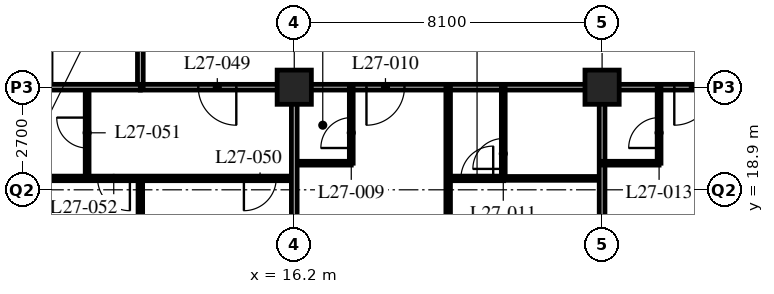
"""IFC4 building model, lengths in metres.
Left out: names, types, materials, properties, quantities, classifications, styles, units other than length and angle.
Written with IfcOpenShell. Run it as: python <this file> out.ifc"""

import sys

from ifc_helpers import new_model, si_unit, direction, frame, frame_2d, origin, origin_2d, place, context, subcontext, project, spatial, rectangle, hollow_rectangle, extrude, element, fill, save


model = new_model("IFC4")
c1 = context("Model", 3, precision=1e-05, world=origin(), true_north=direction((0.0, 1.0)))
c2 = subcontext(c1, "Body", "Model", "MODEL_VIEW")
j1 = project(units=[si_unit("LENGTHUNIT", "METRE"), si_unit("PLANEANGLEUNIT", "RADIAN")], contexts=[c1])
p1 = place(None, origin())
s1 = spatial("IfcSite", under=j1, at=p1, CompositionType="ELEMENT")
p2 = place(p1, origin())
s2 = spatial("IfcBuilding", under=s1, at=p2, CompositionType="ELEMENT")
p3 = place(p2, frame((0.0, 0.0, 110.2)))
s3 = spatial("IfcBuildingStorey", under=s2, at=p3, CompositionType="ELEMENT", Elevation=110.2)
for number, where, z_axis, x_axis in (
    (1, (16.2, 21.6, 0.0), (0.0, 0.0, 1.0), (1.0, 0.0, 0.0)),
    (2, (24.3, 21.6, 0.0), (0.0, 0.0, 1.0), (1.0, 0.0, 0.0)),
):
    element("IfcColumn", number, at=place(p3, frame(where, z_axis=z_axis, x_axis=x_axis)), inside=s3, PredefinedType="COLUMN", context=c2, shape_type="SweptSolid", body=[
        extrude(hollow_rectangle(XDim=0.9, YDim=0.9, WallThickness=0.09, at=origin_2d()), origin(), (0.0, 0.0, 1.0), 3.4),
    ])
p4 = place(p3, frame((12.15, 21.6, 0.0), z_axis=(0.0, 0.0, 1.0), x_axis=(1.0, 0.0, 0.0)))
e3 = element("IfcWall", 3, at=p4, inside=s3, PredefinedType="PARTITIONING", context=c2, shape_type="SweptSolid", body=[
    extrude(rectangle(XDim=32.4, YDim=0.15, at=frame_2d((16.2, 0.0))), origin(), (0.0, 0.0, 1.0), 2.578),
])
p5 = place(p4, frame((5.95, 0.0, 0.0)))
e4 = element("IfcOpeningElement", 4, at=p5, cuts=e3, PredefinedType="OPENING", context=c2, shape_type="SweptSolid", body=[
    extrude(rectangle(XDim=1.0, YDim=2.1, at=frame_2d((0.5, 1.05))), frame((0.0, 0.085, 0.0), z_axis=(0.0, -1.0, 0.0), x_axis=(1.0, 0.0, 0.0)), (0.0, 0.0, 1.0), 0.17),
])
p6 = place(p4, frame((14.05, 0.0, 0.0)))
e5 = element("IfcOpeningElement", 5, at=p6, cuts=e3, PredefinedType="OPENING", context=c2, shape_type="SweptSolid", body=[
    extrude(rectangle(XDim=1.0, YDim=2.1, at=frame_2d((0.5, 1.05))), frame((0.0, 0.085, 0.0), z_axis=(0.0, -1.0, 0.0), x_axis=(1.0, 0.0, 0.0)), (0.0, 0.0, 1.0), 0.17),
])
p7 = place(p4, frame((22.15, 0.0, 0.0)))
e6 = element("IfcOpeningElement", 6, at=p7, cuts=e3, PredefinedType="OPENING", context=c2, shape_type="SweptSolid", body=[
    extrude(rectangle(XDim=1.0, YDim=2.1, at=frame_2d((0.5, 1.05))), frame((0.0, 0.085, 0.0), z_axis=(0.0, -1.0, 0.0), x_axis=(1.0, 0.0, 0.0)), (0.0, 0.0, 1.0), 0.17),
])
p8 = place(p4, frame((1.525, 0.0, 0.0)))
e7 = element("IfcOpeningElement", 7, at=p8, cuts=e3, PredefinedType="OPENING", context=c2, shape_type="SweptSolid", body=[
    extrude(rectangle(XDim=1.0, YDim=2.1, at=frame_2d((0.5, 1.05))), frame((0.0, 0.085, 0.0), z_axis=(0.0, -1.0, 0.0), x_axis=(1.0, 0.0, 0.0)), (0.0, 0.0, 1.0), 0.17),
])
p9 = place(p4, frame((29.875, 0.0, 0.0)))
e8 = element("IfcOpeningElement", 8, at=p9, cuts=e3, PredefinedType="OPENING", context=c2, shape_type="SweptSolid", body=[
    extrude(rectangle(XDim=1.0, YDim=2.1, at=frame_2d((0.5, 1.05))), frame((0.0, 0.085, 0.0), z_axis=(0.0, -1.0, 0.0), x_axis=(1.0, 0.0, 0.0)), (0.0, 0.0, 1.0), 0.17),
])
p10 = place(p3, frame((12.15, 21.6, 0.0), z_axis=(0.0, 0.0, 1.0), x_axis=(0.0, 1.0, 0.0)))
e9 = element("IfcWall", 9, at=p10, inside=s3, PredefinedType="PARTITIONING", context=c2, shape_type="SweptSolid", body=[
    extrude(rectangle(XDim=24.3, YDim=0.15, at=frame_2d((12.15, 0.0))), origin(), (0.0, 0.0, 1.0), 3.19),
])
p11 = place(p10, frame((5.45, 0.0, 0.0)))
e10 = element("IfcOpeningElement", 10, at=p11, cuts=e9, PredefinedType="OPENING", context=c2, shape_type="SweptSolid", body=[
    extrude(rectangle(XDim=1.0, YDim=2.1, at=frame_2d((0.5, 1.05))), frame((0.0, 0.085, 0.0), z_axis=(0.0, -1.0, 0.0), x_axis=(1.0, 0.0, 0.0)), (0.0, 0.0, 1.0), 0.17),
])
p12 = place(p10, frame((13.55, 0.0, 0.0)))
e11 = element("IfcOpeningElement", 11, at=p12, cuts=e9, PredefinedType="OPENING", context=c2, shape_type="SweptSolid", body=[
    extrude(rectangle(XDim=1.0, YDim=2.1, at=frame_2d((0.5, 1.05))), frame((0.0, 0.085, 0.0), z_axis=(0.0, -1.0, 0.0), x_axis=(1.0, 0.0, 0.0)), (0.0, 0.0, 1.0), 0.17),
])
p13 = place(p10, frame((21.65, 0.0, 0.0)))
e12 = element("IfcOpeningElement", 12, at=p13, cuts=e9, PredefinedType="OPENING", context=c2, shape_type="SweptSolid", body=[
    extrude(rectangle(XDim=1.0, YDim=2.1, at=frame_2d((0.5, 1.05))), frame((0.0, 0.085, 0.0), z_axis=(0.0, -1.0, 0.0), x_axis=(1.0, 0.0, 0.0)), (0.0, 0.0, 1.0), 0.17),
])
p14 = place(p3, frame((16.2, 19.6, 0.0), z_axis=(0.0, 0.0, 1.0), x_axis=(1.0, 0.0, 0.0)))
e13 = element("IfcWall", 13, at=p14, inside=s3, PredefinedType="PARTITIONING", context=c2, shape_type="SweptSolid", body=[
    extrude(rectangle(XDim=1.5, YDim=0.1, at=frame_2d((0.75, 0.0))), origin(), (0.0, 0.0, 1.0), 3.19),
])
p15 = place(p3, frame((17.7, 21.6, 0.0), z_axis=(0.0, 0.0, 1.0), x_axis=(0.0, -1.0, 0.0)))
e14 = element("IfcWall", 14, at=p15, inside=s3, PredefinedType="PARTITIONING", context=c2, shape_type="SweptSolid", body=[
    extrude(rectangle(XDim=2.0, YDim=0.1, at=frame_2d((1.0, 0.0))), origin(), (0.0, 0.0, 1.0), 3.19),
])
p16 = place(p15, frame((0.8, 0.0, 0.0)))
e15 = element("IfcOpeningElement", 15, at=p16, cuts=e14, PredefinedType="OPENING", context=c2, shape_type="SweptSolid", body=[
    extrude(rectangle(XDim=0.8, YDim=2.1, at=frame_2d((0.4, 1.05))), frame((0.0, 0.06, 0.0), z_axis=(0.0, -1.0, 0.0), x_axis=(1.0, 0.0, 0.0)), (0.0, 0.0, 1.0), 0.12),
])
p17 = place(p3, frame((21.7, 19.2, 0.0), z_axis=(0.0, 0.0, 1.0), x_axis=(1.0, 0.0, 0.0)))
e16 = element("IfcWall", 16, at=p17, inside=s3, PredefinedType="PARTITIONING", context=c2, shape_type="SweptSolid", body=[
    extrude(rectangle(XDim=2.6, YDim=0.1, at=frame_2d((1.3, 0.0))), origin(), (0.0, 0.0, 1.0), 3.19),
])
p18 = place(p3, frame((21.7, 21.6, 0.0), z_axis=(0.0, 0.0, 1.0), x_axis=(0.0, -1.0, 0.0)))
e17 = element("IfcWall", 17, at=p18, inside=s3, PredefinedType="PARTITIONING", context=c2, shape_type="SweptSolid", body=[
    extrude(rectangle(XDim=2.4, YDim=0.1, at=frame_2d((1.2, 0.0))), origin(), (0.0, 0.0, 1.0), 3.19),
])
p19 = place(p18, frame((1.35, 0.0, 0.0)))
e18 = element("IfcOpeningElement", 18, at=p19, cuts=e17, PredefinedType="OPENING", context=c2, shape_type="SweptSolid", body=[
    extrude(rectangle(XDim=0.8, YDim=2.1, at=frame_2d((0.4, 1.05))), frame((0.0, 0.06, 0.0), z_axis=(0.0, -1.0, 0.0), x_axis=(1.0, 0.0, 0.0)), (0.0, 0.0, 1.0), 0.12),
])
p20 = place(p3, frame((20.25, 21.6, 0.0), z_axis=(0.0, 0.0, 1.0), x_axis=(0.0, -1.0, 0.0)))
e19 = element("IfcWall", 19, at=p20, inside=s3, PredefinedType="PARTITIONING", context=c2, shape_type="SweptSolid", body=[
    extrude(rectangle(XDim=15.9, YDim=0.12, at=frame_2d((7.95, 0.0))), origin(), (0.0, 0.0, 1.0), 3.19),
])
p21 = place(p20, frame((8.875, 0.0, 0.0)))
e20 = element("IfcOpeningElement", 20, at=p21, cuts=e19, PredefinedType="OPENING", context=c2, shape_type="SweptSolid", body=[
    extrude(rectangle(XDim=0.85, YDim=2.1, at=frame_2d((0.425, 1.05))), frame((0.0, 0.07, 0.0), z_axis=(0.0, -1.0, 0.0), x_axis=(1.0, 0.0, 0.0)), (0.0, 0.0, 1.0), 0.14),
])
p22 = place(p3, frame((24.3, 21.6, 0.0), z_axis=(0.0, 0.0, 1.0), x_axis=(0.0, -1.0, 0.0)))
e21 = element("IfcWall", 21, at=p22, inside=s3, PredefinedType="PARTITIONING", context=c2, shape_type="SweptSolid", body=[
    extrude(rectangle(XDim=15.9, YDim=0.15, at=frame_2d((7.95, 0.0))), origin(), (0.0, 0.0, 1.0), 2.578),
])
p23 = place(p3, frame((24.3, 19.6, 0.0), z_axis=(0.0, 0.0, 1.0), x_axis=(1.0, 0.0, 0.0)))
e22 = element("IfcWall", 22, at=p23, inside=s3, PredefinedType="PARTITIONING", context=c2, shape_type="SweptSolid", body=[
    extrude(rectangle(XDim=1.5, YDim=0.1, at=frame_2d((0.75, 0.0))), origin(), (0.0, 0.0, 1.0), 3.19),
])
p24 = place(p3, frame((25.8, 21.6, 0.0), z_axis=(0.0, 0.0, 1.0), x_axis=(0.0, -1.0, 0.0)))
e23 = element("IfcWall", 23, at=p24, inside=s3, PredefinedType="PARTITIONING", context=c2, shape_type="SweptSolid", body=[
    extrude(rectangle(XDim=2.0, YDim=0.1, at=frame_2d((1.0, 0.0))), origin(), (0.0, 0.0, 1.0), 3.19),
])
p25 = place(p24, frame((0.8, 0.0, 0.0)))
e24 = element("IfcOpeningElement", 24, at=p25, cuts=e23, PredefinedType="OPENING", context=c2, shape_type="SweptSolid", body=[
    extrude(rectangle(XDim=0.8, YDim=2.1, at=frame_2d((0.4, 1.05))), frame((0.0, 0.06, 0.0), z_axis=(0.0, -1.0, 0.0), x_axis=(1.0, 0.0, 0.0)), (0.0, 0.0, 1.0), 0.12),
])
p26 = place(p3, frame((10.75, 21.6, 0.0), z_axis=(0.0, 0.0, 1.0), x_axis=(0.0, -1.0, 0.0)))
e25 = element("IfcWall", 25, at=p26, inside=s3, PredefinedType="PARTITIONING", context=c2, shape_type="SweptSolid", body=[
    extrude(rectangle(XDim=2.4, YDim=0.1, at=frame_2d((1.2, 0.0))), origin(), (0.0, 0.0, 1.0), 3.19),
])
p27 = place(p26, frame((0.8, 0.0, 0.0)))
e26 = element("IfcOpeningElement", 26, at=p27, cuts=e25, PredefinedType="OPENING", context=c2, shape_type="SweptSolid", body=[
    extrude(rectangle(XDim=0.8, YDim=2.1, at=frame_2d((0.4, 1.05))), frame((0.0, 0.06, 0.0), z_axis=(0.0, -1.0, 0.0), x_axis=(1.0, 0.0, 0.0)), (0.0, 0.0, 1.0), 0.12),
])
p28 = place(p3, frame((8.15, 19.2, 0.0), z_axis=(0.0, 0.0, 1.0), x_axis=(1.0, 0.0, 0.0)))
e27 = element("IfcWall", 27, at=p28, inside=s3, PredefinedType="PARTITIONING", context=c2, shape_type="SweptSolid", body=[
    extrude(rectangle(XDim=8.05, YDim=0.12, at=frame_2d((4.025, 0.0))), origin(), (0.0, 0.0, 1.0), 3.19),
])
p29 = place(p28, frame((6.725, 0.0, 0.0)))
e28 = element("IfcOpeningElement", 28, at=p29, cuts=e27, PredefinedType="OPENING", context=c2, shape_type="SweptSolid", body=[
    extrude(rectangle(XDim=0.85, YDim=2.1, at=frame_2d((0.425, 1.05))), frame((0.0, 0.07, 0.0), z_axis=(0.0, -1.0, 0.0), x_axis=(1.0, 0.0, 0.0)), (0.0, 0.0, 1.0), 0.14),
])
p30 = place(p28, frame((2.875, 0.0, 0.0)))
e29 = element("IfcOpeningElement", 29, at=p30, cuts=e27, PredefinedType="OPENING", context=c2, shape_type="SweptSolid", body=[
    extrude(rectangle(XDim=0.85, YDim=2.1, at=frame_2d((0.425, 1.05))), frame((0.0, 0.07, 0.0), z_axis=(0.0, -1.0, 0.0), x_axis=(1.0, 0.0, 0.0)), (0.0, 0.0, 1.0), 0.14),
])
p31 = place(p3, frame((12.15, 19.2, 0.0), z_axis=(0.0, 0.0, 1.0), x_axis=(0.0, -1.0, 0.0)))
e30 = element("IfcWall", 30, at=p31, inside=s3, PredefinedType="PARTITIONING", context=c2, shape_type="SweptSolid", body=[
    extrude(rectangle(XDim=13.5, YDim=0.12, at=frame_2d((6.75, 0.0))), origin(), (0.0, 0.0, 1.0), 3.19),
])
p32 = place(p3, frame((0.3, 21.6, 0.0), z_axis=(0.0, 0.0, 1.0), x_axis=(1.0, 0.0, 0.0)))
e31 = element("IfcWall", 31, at=p32, inside=s3, PredefinedType="PARTITIONING", context=c2, shape_type="SweptSolid", body=[
    extrude(rectangle(XDim=11.85, YDim=0.15, at=frame_2d((5.925, 0.0))), origin(), (0.0, 0.0, 1.0), 2.578),
])
p33 = place(p3, frame((16.2, 21.6, 0.0), z_axis=(0.0, 0.0, 1.0), x_axis=(0.0, -1.0, 0.0)))
e32 = element("IfcWall", 32, at=p33, inside=s3, PredefinedType="PARTITIONING", context=c2, shape_type="SweptSolid", body=[
    extrude(rectangle(XDim=15.9, YDim=0.15, at=frame_2d((7.95, 0.0))), origin(), (0.0, 0.0, 1.0), 2.578),
])
p34 = place(p3, frame((21.71, 19.2, 0.0), z_axis=(0.0, 0.0, 1.0), x_axis=(-1.0, 0.0, 0.0)))
e33 = element("IfcWall", 33, at=p34, inside=s3, PredefinedType="PARTITIONING", context=c2, shape_type="SweptSolid", body=[
    extrude(rectangle(XDim=1.46, YDim=0.12, at=frame_2d((0.73, 0.0))), origin(), (0.0, 0.0, 1.0), 3.19),
])
p35 = place(p34, frame((0.275, 0.0, 0.0)))
e34 = element("IfcOpeningElement", 34, at=p35, cuts=e33, PredefinedType="OPENING", context=c2, shape_type="SweptSolid", body=[
    extrude(rectangle(XDim=0.85, YDim=2.1, at=frame_2d((0.425, 1.05))), frame((0.0, 0.07, 0.0), z_axis=(0.0, -1.0, 0.0), x_axis=(1.0, 0.0, 0.0)), (0.0, 0.0, 1.0), 0.14),
])
p36 = place(p16, origin())
e35 = element("IfcDoor", 35, at=p36, inside=s3, OperationType="SINGLE_SWING_LEFT", PredefinedType="DOOR", context=c2, shape_type="SweptSolid", body=[
    extrude(rectangle(XDim=0.8, YDim=2.1, at=frame_2d((0.4, 1.05))), frame((0.0, 0.025, 0.0), z_axis=(0.0, -1.0, 0.0), x_axis=(1.0, 0.0, 0.0)), (0.0, 0.0, 1.0), 0.05),
])
fill(e15, e35)
p37 = place(p5, origin())
e36 = element("IfcDoor", 36, at=p37, inside=s3, OperationType="SINGLE_SWING_RIGHT", PredefinedType="DOOR", context=c2, shape_type="SweptSolid", body=[
    extrude(rectangle(XDim=1.0, YDim=2.1, at=frame_2d((0.5, 1.05))), frame((0.0, 0.025, 0.0), z_axis=(0.0, -1.0, 0.0), x_axis=(1.0, 0.0, 0.0)), (0.0, 0.0, 1.0), 0.05),
])
fill(e4, e36)
p38 = place(p19, origin())
e37 = element("IfcDoor", 37, at=p38, inside=s3, OperationType="SINGLE_SWING_LEFT", PredefinedType="DOOR", context=c2, shape_type="SweptSolid", body=[
    extrude(rectangle(XDim=0.8, YDim=2.1, at=frame_2d((0.4, 1.05))), frame((0.0, 0.025, 0.0), z_axis=(0.0, -1.0, 0.0), x_axis=(1.0, 0.0, 0.0)), (0.0, 0.0, 1.0), 0.05),
])
fill(e18, e37)
p39 = place(p25, origin())
e38 = element("IfcDoor", 38, at=p39, inside=s3, OperationType="SINGLE_SWING_LEFT", PredefinedType="DOOR", context=c2, shape_type="SweptSolid", body=[
    extrude(rectangle(XDim=0.8, YDim=2.1, at=frame_2d((0.4, 1.05))), frame((0.0, 0.025, 0.0), z_axis=(0.0, -1.0, 0.0), x_axis=(1.0, 0.0, 0.0)), (0.0, 0.0, 1.0), 0.05),
])
fill(e24, e38)
p40 = place(p6, origin())
e39 = element("IfcDoor", 39, at=p40, inside=s3, OperationType="SINGLE_SWING_RIGHT", PredefinedType="DOOR", context=c2, shape_type="SweptSolid", body=[
    extrude(rectangle(XDim=1.0, YDim=2.1, at=frame_2d((0.5, 1.05))), frame((0.0, 0.025, 0.0), z_axis=(0.0, -1.0, 0.0), x_axis=(1.0, 0.0, 0.0)), (0.0, 0.0, 1.0), 0.05),
])
fill(e5, e39)
p41 = place(p8, origin())
e40 = element("IfcDoor", 40, at=p41, inside=s3, OperationType="SINGLE_SWING_LEFT", PredefinedType="DOOR", context=c2, shape_type="SweptSolid", body=[
    extrude(rectangle(XDim=1.0, YDim=2.1, at=frame_2d((0.5, 1.05))), frame((0.0, 0.025, 0.0), z_axis=(0.0, -1.0, 0.0), x_axis=(1.0, 0.0, 0.0)), (0.0, 0.0, 1.0), 0.05),
])
fill(e7, e40)
p42 = place(p29, origin())
e41 = element("IfcDoor", 41, at=p42, inside=s3, OperationType="SINGLE_SWING_RIGHT", PredefinedType="DOOR", context=c2, shape_type="SweptSolid", body=[
    extrude(rectangle(XDim=0.85, YDim=2.1, at=frame_2d((0.425, 1.05))), frame((0.0, 0.025, 0.0), z_axis=(0.0, -1.0, 0.0), x_axis=(1.0, 0.0, 0.0)), (0.0, 0.0, 1.0), 0.05),
])
fill(e28, e41)
p43 = place(p27, origin())
e42 = element("IfcDoor", 42, at=p43, inside=s3, OperationType="SINGLE_SWING_RIGHT", PredefinedType="DOOR", context=c2, shape_type="SweptSolid", body=[
    extrude(rectangle(XDim=0.8, YDim=2.1, at=frame_2d((0.4, 1.05))), frame((0.0, 0.025, 0.0), z_axis=(0.0, -1.0, 0.0), x_axis=(1.0, 0.0, 0.0)), (0.0, 0.0, 1.0), 0.05),
])
fill(e26, e42)
p44 = place(p30, origin())
e43 = element("IfcDoor", 43, at=p44, inside=s3, OperationType="SINGLE_SWING_LEFT", PredefinedType="DOOR", context=c2, shape_type="SweptSolid", body=[
    extrude(rectangle(XDim=0.85, YDim=2.1, at=frame_2d((0.425, 1.05))), frame((0.0, 0.025, 0.0), z_axis=(0.0, -1.0, 0.0), x_axis=(1.0, 0.0, 0.0)), (0.0, 0.0, 1.0), 0.05),
])
fill(e29, e43)
p45 = place(p35, origin())
e44 = element("IfcDoor", 44, at=p45, inside=s3, OperationType="SINGLE_SWING_RIGHT", PredefinedType="DOOR", context=c2, shape_type="SweptSolid", body=[
    extrude(rectangle(XDim=0.85, YDim=2.1, at=frame_2d((0.425, 1.05))), frame((0.0, 0.025, 0.0), z_axis=(0.0, -1.0, 0.0), x_axis=(1.0, 0.0, 0.0)), (0.0, 0.0, 1.0), 0.05),
])
fill(e34, e44)
save(model, sys.argv[1])
